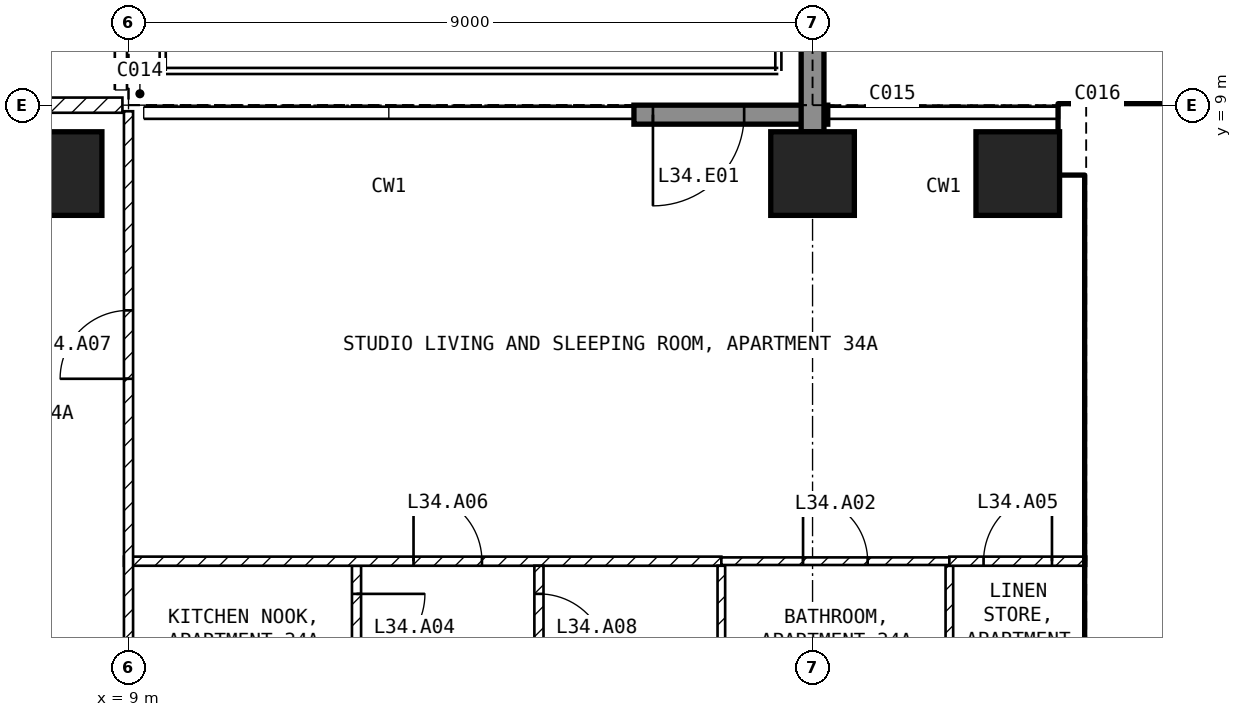
"""IFC4 building model, lengths in metres.
Left out: names, types, materials, properties, quantities, classifications, styles, units other than length and angle.
Written with IfcOpenShell. Run it as: python <this file> out.ifc"""

import sys

from ifc_helpers import new_model, si_unit, direction, frame, frame_2d, origin, origin_2d, place, context, subcontext, project, spatial, rectangle, extrude, element, fill, save


model = new_model("IFC4")
c1 = context("Model", 3, precision=1e-05, world=origin(), true_north=direction((0.0, 1.0)))
c2 = subcontext(c1, "Body", "Model", "MODEL_VIEW")
j1 = project(units=[si_unit("LENGTHUNIT", "METRE"), si_unit("PLANEANGLEUNIT", "RADIAN")], contexts=[c1])
p1 = place(None, origin())
s1 = spatial("IfcSite", under=j1, at=p1, CompositionType="ELEMENT")
p2 = place(p1, origin())
s2 = spatial("IfcBuilding", under=s1, at=p2, CompositionType="ELEMENT")
p3 = place(p2, frame((0.0, 0.0, 140.9)))
s3 = spatial("IfcBuildingStorey", under=s2, at=p3, CompositionType="ELEMENT", Elevation=140.9)
for number, where, z_axis, x_axis in (
    (1, (8.1, 8.1, -0.25), (0.0, 0.0, 1.0), (1.0, 0.0, 0.0)),
    (2, (18.0, 8.1, -0.25), (0.0, 0.0, 1.0), (1.0, 0.0, 0.0)),
    (3, (20.7, 8.1, -0.25), (0.0, 0.0, 1.0), (1.0, 0.0, 0.0)),
):
    element("IfcColumn", number, at=place(p3, frame(where, z_axis=z_axis, x_axis=x_axis)), inside=s3, PredefinedType="COLUMN", context=c2, shape_type="SweptSolid", body=[
        extrude(rectangle(XDim=1.1, YDim=1.1, at=origin_2d()), origin(), (0.0, 0.0, 1.0), 3.5),
    ])
p4 = place(p3, frame((18.2, 8.875, 0.0), z_axis=(0.0, 0.0, 1.0), x_axis=(-1.0, 0.0, 0.0)))
e4 = element("IfcWall", 4, at=p4, inside=s3, PredefinedType="SOLIDWALL", context=c2, shape_type="SweptSolid", body=[
    extrude(rectangle(XDim=2.55, YDim=0.25, at=frame_2d((1.275, 0.0))), origin(), (0.0, 0.0, 1.0), 3.25),
])
p5 = place(p4, frame((1.1, 0.0, 0.0)))
e5 = element("IfcOpeningElement", 5, at=p5, cuts=e4, PredefinedType="OPENING", context=c2, shape_type="SweptSolid", body=[
    extrude(rectangle(XDim=1.2, YDim=2.4, at=frame_2d((0.6, 1.2))), frame((0.0, 0.135, 0.0), z_axis=(0.0, -1.0, 0.0), x_axis=(1.0, 0.0, 0.0)), (0.0, 0.0, 1.0), 0.27),
])
p6 = place(p3, frame((18.0, 8.65, 0.0), z_axis=(0.0, 0.0, 1.0), x_axis=(0.0, 1.0, 0.0)))
e6 = element("IfcWall", 6, at=p6, inside=s3, PredefinedType="SOLIDWALL", context=c2, shape_type="SweptSolid", body=[
    extrude(rectangle(XDim=3.09, YDim=0.3, at=frame_2d((1.545, 0.0))), origin(), (0.0, 0.0, 1.0), 3.25),
])
p7 = place(p3, frame((21.25, 8.55, 0.0), z_axis=(0.0, 0.0, 1.0), x_axis=(1.0, 0.0, 0.0)))
e7 = element("IfcWall", 7, at=p7, inside=s3, PredefinedType="SHEAR", context=c2, shape_type="SweptSolid", body=[
    extrude(rectangle(XDim=8.2, YDim=0.9, at=frame_2d((4.1, 0.0))), origin(), (0.0, 0.0, 1.0), 3.25),
])
p8 = place(p3, frame((21.825, 1.2, 0.0), z_axis=(0.0, 0.0, 1.0), x_axis=(0.0, 1.0, 0.0)))
e8 = element("IfcWall", 8, at=p8, inside=s3, PredefinedType="SHEAR", context=c2, shape_type="SweptSolid", body=[
    extrude(rectangle(XDim=6.9, YDim=0.45, at=frame_2d((3.45, 0.0))), origin(), (0.0, 0.0, 1.0), 3.25),
])
p9 = place(p3, frame((22.05, 5.15, 0.0), z_axis=(0.0, 0.0, 1.0), x_axis=(1.0, 0.0, 0.0)))
e9 = element("IfcWall", 9, at=p9, inside=s3, PredefinedType="SOLIDWALL", context=c2, shape_type="SweptSolid", body=[
    extrude(rectangle(XDim=6.3, YDim=0.2, at=frame_2d((3.15, 0.0))), origin(), (0.0, 0.0, 1.0), 3.25),
])
p10 = place(p9, frame((0.2, 0.0, 0.0)))
e10 = element("IfcOpeningElement", 10, at=p10, cuts=e9, PredefinedType="OPENING", context=c2, shape_type="SweptSolid", body=[
    extrude(rectangle(XDim=1.0, YDim=2.1, at=frame_2d((0.5, 1.05))), frame((0.0, 0.11, 0.0), z_axis=(0.0, -1.0, 0.0), x_axis=(1.0, 0.0, 0.0)), (0.0, 0.0, 1.0), 0.22),
])
p11 = place(p3, frame((-8.92, 9.0, 0.0), z_axis=(0.0, 0.0, 1.0), x_axis=(1.0, 0.0, 0.0)))
e11 = element("IfcWall", 11, at=p11, inside=s3, PredefinedType="PARTITIONING", context=c2, shape_type="SweptSolid", body=[
    extrude(rectangle(XDim=17.84, YDim=0.2, at=frame_2d((8.92, 0.0))), origin(), (0.0, 0.0, 1.0), 3.25),
])
p12 = place(p11, frame((8.42, 0.0, 0.0)))
e12 = element("IfcOpeningElement", 12, at=p12, cuts=e11, PredefinedType="OPENING", context=c2, shape_type="SweptSolid", body=[
    extrude(rectangle(XDim=1.0, YDim=2.1, at=frame_2d((0.5, 1.05))), frame((0.0, 0.11, 0.0), z_axis=(0.0, -1.0, 0.0), x_axis=(1.0, 0.0, 0.0)), (0.0, 0.0, 1.0), 0.22),
])
p13 = place(p3, frame((12.0, 2.94, 0.0), z_axis=(0.0, 0.0, 1.0), x_axis=(0.0, -1.0, 0.0)))
e13 = element("IfcWall", 13, at=p13, inside=s3, PredefinedType="PARTITIONING", context=c2, shape_type="SweptSolid", body=[
    extrude(rectangle(XDim=1.64, YDim=0.12, at=frame_2d((0.82, 0.0))), origin(), (0.0, 0.0, 1.0), 3.25),
])
p14 = place(p13, frame((0.37, 0.0, 0.0)))
e14 = element("IfcOpeningElement", 14, at=p14, cuts=e13, PredefinedType="OPENING", context=c2, shape_type="SweptSolid", body=[
    extrude(rectangle(XDim=0.9, YDim=2.1, at=frame_2d((0.45, 1.05))), frame((0.0, 0.07, 0.0), z_axis=(0.0, -1.0, 0.0), x_axis=(1.0, 0.0, 0.0)), (0.0, 0.0, 1.0), 0.14),
])
p15 = place(p3, frame((8.94, 3.0, 0.0), z_axis=(0.0, 0.0, 1.0), x_axis=(1.0, 0.0, 0.0)))
e15 = element("IfcWall", 15, at=p15, inside=s3, PredefinedType="PARTITIONING", context=c2, shape_type="SweptSolid", body=[
    extrude(rectangle(XDim=7.86, YDim=0.12, at=frame_2d((3.93, 0.0))), origin(), (0.0, 0.0, 1.0), 3.25),
])
p16 = place(p15, frame((3.81, 0.0, 0.0)))
e16 = element("IfcOpeningElement", 16, at=p16, cuts=e15, PredefinedType="OPENING", context=c2, shape_type="SweptSolid", body=[
    extrude(rectangle(XDim=0.9, YDim=2.1, at=frame_2d((0.45, 1.05))), frame((0.0, 0.07, 0.0), z_axis=(0.0, -1.0, 0.0), x_axis=(1.0, 0.0, 0.0)), (0.0, 0.0, 1.0), 0.14),
])
p17 = place(p3, frame((9.0, 1.3, 0.0), z_axis=(0.0, 0.0, 1.0), x_axis=(0.0, 1.0, 0.0)))
e17 = element("IfcWall", 17, at=p17, inside=s3, PredefinedType="PARTITIONING", context=c2, shape_type="SweptSolid", body=[
    extrude(rectangle(XDim=7.62, YDim=0.12, at=frame_2d((3.81, 0.0))), origin(), (0.0, 0.0, 1.0), 3.25),
])
p18 = place(p17, frame((4.1, 0.0, 0.0)))
e18 = element("IfcOpeningElement", 18, at=p18, cuts=e17, PredefinedType="OPENING", context=c2, shape_type="SweptSolid", body=[
    extrude(rectangle(XDim=0.9, YDim=2.1, at=frame_2d((0.45, 1.05))), frame((0.0, 0.07, 0.0), z_axis=(0.0, -1.0, 0.0), x_axis=(1.0, 0.0, 0.0)), (0.0, 0.0, 1.0), 0.14),
])
p19 = place(p3, frame((14.4, 2.94, 0.0), z_axis=(0.0, 0.0, 1.0), x_axis=(0.0, -1.0, 0.0)))
e19 = element("IfcWall", 19, at=p19, inside=s3, PredefinedType="PARTITIONING", context=c2, shape_type="SweptSolid", body=[
    extrude(rectangle(XDim=1.64, YDim=0.12, at=frame_2d((0.82, 0.0))), origin(), (0.0, 0.0, 1.0), 3.25),
])
p20 = place(p19, frame((0.37, 0.0, 0.0)))
e20 = element("IfcOpeningElement", 20, at=p20, cuts=e19, PredefinedType="OPENING", context=c2, shape_type="SweptSolid", body=[
    extrude(rectangle(XDim=0.9, YDim=2.1, at=frame_2d((0.45, 1.05))), frame((0.0, 0.07, 0.0), z_axis=(0.0, -1.0, 0.0), x_axis=(1.0, 0.0, 0.0)), (0.0, 0.0, 1.0), 0.14),
])
for number, where, z_axis, x_axis in (
    (21, (16.8, 2.94, 0.0), (0.0, 0.0, 1.0), (0.0, -1.0, 0.0)),
    (22, (19.8, 2.94, 0.0), (0.0, 0.0, 1.0), (0.0, -1.0, 0.0)),
):
    element("IfcWall", number, at=place(p3, frame(where, z_axis=z_axis, x_axis=x_axis)), inside=s3, PredefinedType="PARTITIONING", context=c2, shape_type="SweptSolid", body=[
        extrude(rectangle(XDim=1.64, YDim=0.1, at=frame_2d((0.82, 0.0))), origin(), (0.0, 0.0, 1.0), 3.25),
    ])
p21 = place(p3, frame((16.8, 3.0, 0.0), z_axis=(0.0, 0.0, 1.0), x_axis=(1.0, 0.0, 0.0)))
e23 = element("IfcWall", 23, at=p21, inside=s3, PredefinedType="PARTITIONING", context=c2, shape_type="SweptSolid", body=[
    extrude(rectangle(XDim=3.0, YDim=0.1, at=frame_2d((1.5, 0.0))), origin(), (0.0, 0.0, 1.0), 3.25),
])
p22 = place(p21, frame((1.075, 0.0, 0.0)))
e24 = element("IfcOpeningElement", 24, at=p22, cuts=e23, PredefinedType="OPENING", context=c2, shape_type="SweptSolid", body=[
    extrude(rectangle(XDim=0.85, YDim=2.1, at=frame_2d((0.425, 1.05))), frame((0.0, 0.06, 0.0), z_axis=(0.0, -1.0, 0.0), x_axis=(1.0, 0.0, 0.0)), (0.0, 0.0, 1.0), 0.12),
])
p23 = place(p3, frame((19.8, 3.0, 0.0), z_axis=(0.0, 0.0, 1.0), x_axis=(1.0, 0.0, 0.0)))
e25 = element("IfcWall", 25, at=p23, inside=s3, PredefinedType="PARTITIONING", context=c2, shape_type="SweptSolid", body=[
    extrude(rectangle(XDim=1.8, YDim=0.12, at=frame_2d((0.9, 0.0))), origin(), (0.0, 0.0, 1.0), 3.25),
])
p24 = place(p23, frame((0.45, 0.0, 0.0)))
e26 = element("IfcOpeningElement", 26, at=p24, cuts=e25, PredefinedType="OPENING", context=c2, shape_type="SweptSolid", body=[
    extrude(rectangle(XDim=0.9, YDim=2.1, at=frame_2d((0.45, 1.05))), frame((0.0, 0.07, 0.0), z_axis=(0.0, -1.0, 0.0), x_axis=(1.0, 0.0, 0.0)), (0.0, 0.0, 1.0), 0.14),
])
p25 = place(p5, origin())
e27 = element("IfcDoor", 27, at=p25, inside=s3, OperationType="SINGLE_SWING_RIGHT", PredefinedType="DOOR", context=c2, shape_type="SweptSolid", body=[
    extrude(rectangle(XDim=1.2, YDim=2.4, at=frame_2d((0.6, 1.2))), frame((0.0, 0.025, 0.0), z_axis=(0.0, -1.0, 0.0), x_axis=(1.0, 0.0, 0.0)), (0.0, 0.0, 1.0), 0.05),
])
fill(e5, e27)
p26 = place(p10, origin())
e28 = element("IfcDoor", 28, at=p26, inside=s3, OperationType="SINGLE_SWING_LEFT", PredefinedType="DOOR", context=c2, shape_type="SweptSolid", body=[
    extrude(rectangle(XDim=1.0, YDim=2.1, at=frame_2d((0.5, 1.05))), frame((0.0, 0.025, 0.0), z_axis=(0.0, -1.0, 0.0), x_axis=(1.0, 0.0, 0.0)), (0.0, 0.0, 1.0), 0.05),
])
fill(e10, e28)
p27 = place(p22, origin())
e29 = element("IfcDoor", 29, at=p27, inside=s3, OperationType="SINGLE_SWING_LEFT", PredefinedType="DOOR", context=c2, shape_type="SweptSolid", body=[
    extrude(rectangle(XDim=0.85, YDim=2.1, at=frame_2d((0.425, 1.05))), frame((0.0, 0.025, 0.0), z_axis=(0.0, -1.0, 0.0), x_axis=(1.0, 0.0, 0.0)), (0.0, 0.0, 1.0), 0.05),
])
fill(e24, e29)
p28 = place(p14, origin())
e30 = element("IfcDoor", 30, at=p28, inside=s3, OperationType="SINGLE_SWING_LEFT", PredefinedType="DOOR", context=c2, shape_type="SweptSolid", body=[
    extrude(rectangle(XDim=0.9, YDim=2.1, at=frame_2d((0.45, 1.05))), frame((0.0, 0.025, 0.0), z_axis=(0.0, -1.0, 0.0), x_axis=(1.0, 0.0, 0.0)), (0.0, 0.0, 1.0), 0.05),
])
fill(e14, e30)
p29 = place(p24, origin())
e31 = element("IfcDoor", 31, at=p29, inside=s3, OperationType="SINGLE_SWING_RIGHT", PredefinedType="DOOR", context=c2, shape_type="SweptSolid", body=[
    extrude(rectangle(XDim=0.9, YDim=2.1, at=frame_2d((0.45, 1.05))), frame((0.0, 0.025, 0.0), z_axis=(0.0, -1.0, 0.0), x_axis=(1.0, 0.0, 0.0)), (0.0, 0.0, 1.0), 0.05),
])
fill(e26, e31)
p30 = place(p16, origin())
e32 = element("IfcDoor", 32, at=p30, inside=s3, OperationType="SINGLE_SWING_LEFT", PredefinedType="DOOR", context=c2, shape_type="SweptSolid", body=[
    extrude(rectangle(XDim=0.9, YDim=2.1, at=frame_2d((0.45, 1.05))), frame((0.0, 0.025, 0.0), z_axis=(0.0, -1.0, 0.0), x_axis=(1.0, 0.0, 0.0)), (0.0, 0.0, 1.0), 0.05),
])
fill(e16, e32)
p31 = place(p18, origin())
e33 = element("IfcDoor", 33, at=p31, inside=s3, OperationType="SINGLE_SWING_LEFT", PredefinedType="DOOR", context=c2, shape_type="SweptSolid", body=[
    extrude(rectangle(XDim=0.9, YDim=2.1, at=frame_2d((0.45, 1.05))), frame((0.0, 0.025, 0.0), z_axis=(0.0, -1.0, 0.0), x_axis=(1.0, 0.0, 0.0)), (0.0, 0.0, 1.0), 0.05),
])
fill(e18, e33)
p32 = place(p20, origin())
e34 = element("IfcDoor", 34, at=p32, inside=s3, OperationType="SINGLE_SWING_RIGHT", PredefinedType="DOOR", context=c2, shape_type="SweptSolid", body=[
    extrude(rectangle(XDim=0.9, YDim=2.1, at=frame_2d((0.45, 1.05))), frame((0.0, 0.025, 0.0), z_axis=(0.0, -1.0, 0.0), x_axis=(1.0, 0.0, 0.0)), (0.0, 0.0, 1.0), 0.05),
])
fill(e20, e34)
save(model, sys.argv[1])
